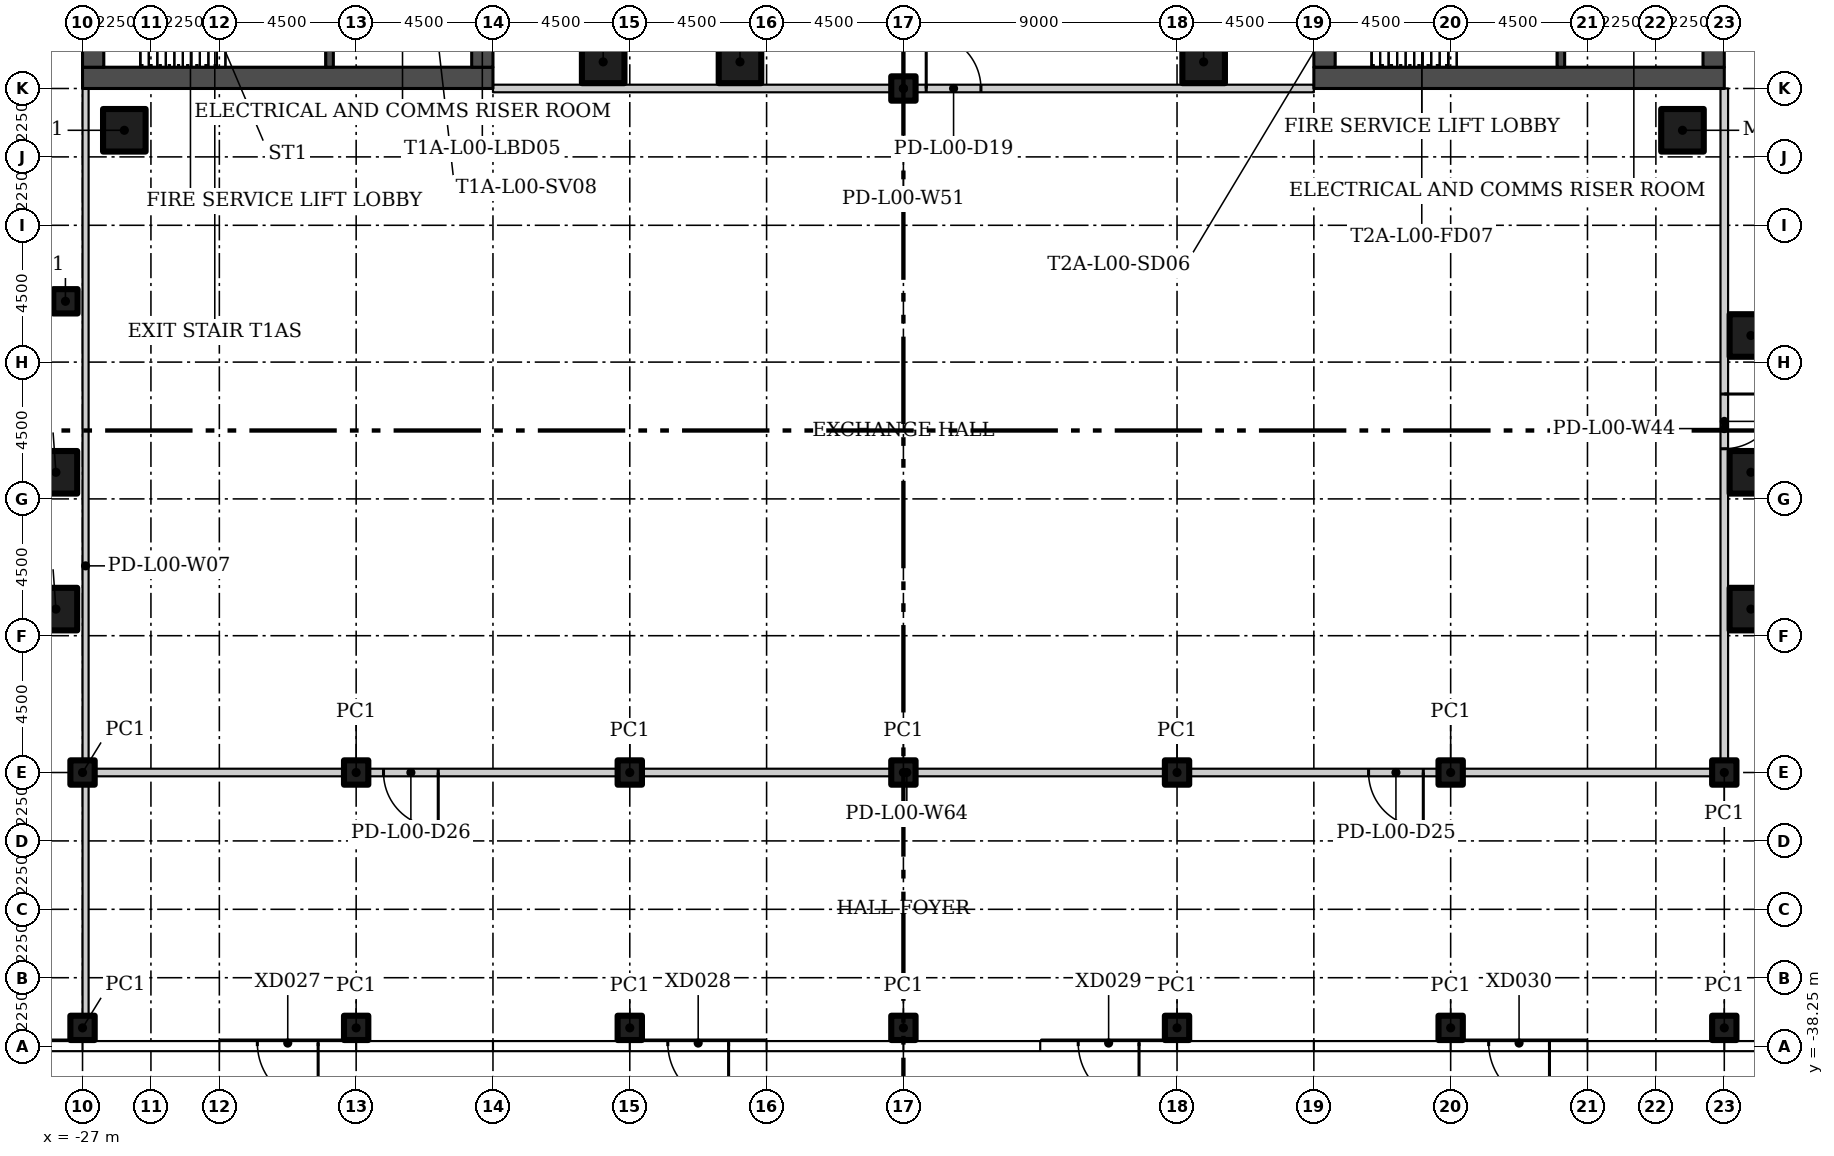
"""IFC4 building model, lengths in metres.
Left out: names, types, materials, properties, quantities, classifications, styles, units other than length and angle.
Written with IfcOpenShell. Run it as: python <this file> out.ifc"""

import sys

from ifc_helpers import new_model, si_unit, direction, frame, frame_2d, origin, origin_2d, place, context, subcontext, project, spatial, rectangle, hollow_rectangle, extrude, element, fill, save


model = new_model("IFC4")
c1 = context("Model", 3, precision=1e-05, world=origin(), true_north=direction((0.0, 1.0)))
c2 = subcontext(c1, "Body", "Model", "MODEL_VIEW")
j1 = project(units=[si_unit("LENGTHUNIT", "METRE"), si_unit("PLANEANGLEUNIT", "RADIAN")], contexts=[c1])
p1 = place(None, origin())
s1 = spatial("IfcSite", under=j1, at=p1, CompositionType="ELEMENT")
p2 = place(p1, origin())
s2 = spatial("IfcBuilding", under=s1, at=p2, CompositionType="ELEMENT")
p3 = place(p2, origin())
s3 = spatial("IfcBuildingStorey", under=s2, at=p3, CompositionType="ELEMENT", Elevation=0.0)
p4 = place(p3, frame((-25.625, -8.125, 0.0)))
e1 = element("IfcColumn", 1, at=p4, inside=s3, PredefinedType="COLUMN", context=c2, shape_type="SweptSolid", body=[
    extrude(hollow_rectangle(XDim=1.4, YDim=1.4, WallThickness=0.06, at=origin_2d()), origin(), (0.0, 0.0, 1.0), 6.5),
])
for number, where in (
    (2, (-9.875, -5.875, 0.0)),
    (3, (-5.375, -5.875, 0.0)),
):
    element("IfcColumn", number, at=place(p3, frame(where)), inside=s3, PredefinedType="COLUMN", context=c2, shape_type="SweptSolid", body=[
        extrude(hollow_rectangle(XDim=1.4, YDim=1.4, WallThickness=0.06, at=origin_2d()), origin(), (0.0, 0.0, 1.0), 6.1),
    ])
p5 = place(p3, frame((-27.562, -13.75, 0.0)))
e4 = element("IfcColumn", 4, at=p5, inside=s3, PredefinedType="COLUMN", context=c2, shape_type="SweptSolid", body=[
    extrude(hollow_rectangle(XDim=0.8, YDim=0.8, WallThickness=0.03, at=origin_2d()), origin(), (0.0, 0.0, 1.0), 6.1),
])
for number, where in (
    (5, (-27.875, -19.375, 0.0)),
    (6, (-27.875, -23.875, 0.0)),
):
    element("IfcColumn", number, at=place(p3, frame(where)), inside=s3, PredefinedType="COLUMN", context=c2, shape_type="SweptSolid", body=[
        extrude(hollow_rectangle(XDim=1.4, YDim=1.4, WallThickness=0.06, at=origin_2d()), origin(), (0.0, 0.0, 1.0), 6.1),
    ])
p6 = place(p3, frame((25.625, -8.125, 0.0)))
e7 = element("IfcColumn", 7, at=p6, inside=s3, PredefinedType="COLUMN", context=c2, shape_type="SweptSolid", body=[
    extrude(hollow_rectangle(XDim=1.4, YDim=1.4, WallThickness=0.06, at=origin_2d()), origin(), (0.0, 0.0, 1.0), 6.5),
])
for number, where in (
    (8, (27.875, -14.875, 0.0)),
    (9, (27.875, -19.375, 0.0)),
    (10, (27.875, -23.875, 0.0)),
    (11, (9.875, -5.875, 0.0)),
):
    element("IfcColumn", number, at=place(p3, frame(where)), inside=s3, PredefinedType="COLUMN", context=c2, shape_type="SweptSolid", body=[
        extrude(hollow_rectangle(XDim=1.4, YDim=1.4, WallThickness=0.06, at=origin_2d()), origin(), (0.0, 0.0, 1.0), 6.1),
    ])
for number, where in (
    (12, (-27.0, -37.65, 0.0)),
    (13, (-27.0, -29.25, 0.0)),
    (14, (-18.0, -37.65, 0.0)),
    (15, (-18.0, -29.25, 0.0)),
    (16, (-9.0, -37.65, 0.0)),
    (17, (-9.0, -29.25, 0.0)),
    (18, (0.0, -37.65, 0.0)),
    (19, (0.0, -29.25, 0.0)),
    (20, (9.0, -37.65, 0.0)),
    (21, (9.0, -29.25, 0.0)),
    (22, (18.0, -37.65, 0.0)),
    (23, (18.0, -29.25, 0.0)),
    (24, (27.0, -37.65, 0.0)),
    (25, (27.0, -29.25, 0.0)),
    (26, (0.0, -6.75, 0.0)),
):
    element("IfcColumn", number, at=place(p3, frame(where)), inside=s3, PredefinedType="COLUMN", context=c2, shape_type="SweptSolid", body=[
        extrude(hollow_rectangle(XDim=0.8, YDim=0.8, WallThickness=0.03, at=origin_2d()), origin(), (0.0, 0.0, 1.0), 6.1),
    ])
p7 = place(p3, frame((-26.9, -38.155, 0.0), z_axis=(0.0, 0.0, 1.0), x_axis=(0.0, 1.0, 0.0)))
e27 = element("IfcWall", 27, at=p7, inside=s3, PredefinedType="PARTITIONING", context=c2, shape_type="SweptSolid", body=[
    extrude(rectangle(XDim=31.405, YDim=0.2, at=frame_2d((15.703, 0.0))), origin(), (0.0, 0.0, 1.0), 12.1),
])
p8 = place(p3, frame((27.0, -6.75, 0.0), z_axis=(0.0, 0.0, 1.0), x_axis=(0.0, -1.0, 0.0)))
e28 = element("IfcWall", 28, at=p8, inside=s3, PredefinedType="PARTITIONING", context=c2, shape_type="SweptSolid", body=[
    extrude(rectangle(XDim=22.375, YDim=0.25, at=frame_2d((11.188, 0.0))), origin(), (0.0, 0.0, 1.0), 12.1),
])
p9 = place(p8, frame((10.05, 0.0, 0.0)))
e29 = element("IfcOpeningElement", 29, at=p9, cuts=e28, PredefinedType="OPENING", context=c2, shape_type="SweptSolid", body=[
    extrude(rectangle(XDim=1.8, YDim=2.4, at=frame_2d((0.9, 1.2))), frame((0.0, 0.135, 0.0), z_axis=(0.0, -1.0, 0.0), x_axis=(1.0, 0.0, 0.0)), (0.0, 0.0, 1.0), 0.27),
])
p10 = place(p3, frame((-13.5, -6.75, 0.0)))
e30 = element("IfcWall", 30, at=p10, inside=s3, PredefinedType="PARTITIONING", context=c2, shape_type="SweptSolid", body=[
    extrude(rectangle(XDim=27.0, YDim=0.25, at=frame_2d((13.5, 0.0))), origin(), (0.0, 0.0, 1.0), 12.1),
])
p11 = place(p10, frame((14.25, 0.0, 0.0)))
e31 = element("IfcOpeningElement", 31, at=p11, cuts=e30, PredefinedType="OPENING", context=c2, shape_type="SweptSolid", body=[
    extrude(rectangle(XDim=1.8, YDim=2.4, at=frame_2d((0.9, 1.2))), frame((0.0, 0.135, 0.0), z_axis=(0.0, -1.0, 0.0), x_axis=(1.0, 0.0, 0.0)), (0.0, 0.0, 1.0), 0.27),
])
p12 = place(p3, frame((27.125, -29.25, 0.0), z_axis=(0.0, 0.0, 1.0), x_axis=(-1.0, 0.0, 0.0)))
e32 = element("IfcWall", 32, at=p12, inside=s3, PredefinedType="PARTITIONING", context=c2, shape_type="SweptSolid", body=[
    extrude(rectangle(XDim=54.025, YDim=0.25, at=frame_2d((27.012, 0.0))), origin(), (0.0, 0.0, 1.0), 12.1),
])
p13 = place(p12, frame((10.025, 0.0, 0.0)))
e33 = element("IfcOpeningElement", 33, at=p13, cuts=e32, PredefinedType="OPENING", context=c2, shape_type="SweptSolid", body=[
    extrude(rectangle(XDim=1.8, YDim=2.4, at=frame_2d((0.9, 1.2))), frame((0.0, 0.135, 0.0), z_axis=(0.0, -1.0, 0.0), x_axis=(1.0, 0.0, 0.0)), (0.0, 0.0, 1.0), 0.27),
])
p14 = place(p12, frame((42.425, 0.0, 0.0)))
e34 = element("IfcOpeningElement", 34, at=p14, cuts=e32, PredefinedType="OPENING", context=c2, shape_type="SweptSolid", body=[
    extrude(rectangle(XDim=1.8, YDim=2.4, at=frame_2d((0.9, 1.2))), frame((0.0, 0.135, 0.0), z_axis=(0.0, -1.0, 0.0), x_axis=(1.0, 0.0, 0.0)), (0.0, 0.0, 1.0), 0.27),
])
p15 = place(p3, frame((-26.993, -38.15, 0.0), z_axis=(0.0, 0.0, 1.0), x_axis=(-1.0, 0.0, 0.0)))
e35 = element("IfcWall", 35, at=p15, inside=s3, PredefinedType="SOLIDWALL", context=c2, shape_type="SweptSolid", body=[
    extrude(rectangle(XDim=4.514, YDim=0.2, at=frame_2d((2.257, 0.0))), origin(), (0.0, 0.0, 1.0), 3.0),
])
p16 = place(p15, frame((1.657, 0.0, 0.0)))
e36 = element("IfcOpeningElement", 36, at=p16, cuts=e35, PredefinedType="OPENING", context=c2, shape_type="SweptSolid", body=[
    extrude(rectangle(XDim=1.2, YDim=2.4, at=frame_2d((0.6, 1.2))), frame((0.0, 0.11, 0.0), z_axis=(0.0, -1.0, 0.0), x_axis=(1.0, 0.0, 0.0)), (0.0, 0.0, 1.0), 0.22),
])
p17 = place(p3, frame((-18.04, -38.15, 0.0), z_axis=(0.0, 0.0, 1.0), x_axis=(-1.0, 0.0, 0.0)))
e37 = element("IfcWall", 37, at=p17, inside=s3, PredefinedType="SOLIDWALL", context=c2, shape_type="SweptSolid", body=[
    extrude(rectangle(XDim=4.42, YDim=0.2, at=frame_2d((2.21, 0.0))), origin(), (0.0, 0.0, 1.0), 3.0),
])
p18 = place(p17, frame((1.21, 0.0, 0.0)))
e38 = element("IfcOpeningElement", 38, at=p18, cuts=e37, PredefinedType="OPENING", context=c2, shape_type="SweptSolid", body=[
    extrude(rectangle(XDim=2.0, YDim=2.4, at=frame_2d((1.0, 1.2))), frame((0.0, 0.11, 0.0), z_axis=(0.0, -1.0, 0.0), x_axis=(1.0, 0.0, 0.0)), (0.0, 0.0, 1.0), 0.22),
])
p19 = place(p3, frame((-4.54, -38.15, 0.0), z_axis=(0.0, 0.0, 1.0), x_axis=(-1.0, 0.0, 0.0)))
e39 = element("IfcWall", 39, at=p19, inside=s3, PredefinedType="SOLIDWALL", context=c2, shape_type="SweptSolid", body=[
    extrude(rectangle(XDim=4.42, YDim=0.2, at=frame_2d((2.21, 0.0))), origin(), (0.0, 0.0, 1.0), 3.0),
])
p20 = place(p19, frame((1.21, 0.0, 0.0)))
e40 = element("IfcOpeningElement", 40, at=p20, cuts=e39, PredefinedType="OPENING", context=c2, shape_type="SweptSolid", body=[
    extrude(rectangle(XDim=2.0, YDim=2.4, at=frame_2d((1.0, 1.2))), frame((0.0, 0.11, 0.0), z_axis=(0.0, -1.0, 0.0), x_axis=(1.0, 0.0, 0.0)), (0.0, 0.0, 1.0), 0.22),
])
p21 = place(p3, frame((8.96, -38.15, 0.0), z_axis=(0.0, 0.0, 1.0), x_axis=(-1.0, 0.0, 0.0)))
e41 = element("IfcWall", 41, at=p21, inside=s3, PredefinedType="SOLIDWALL", context=c2, shape_type="SweptSolid", body=[
    extrude(rectangle(XDim=4.42, YDim=0.2, at=frame_2d((2.21, 0.0))), origin(), (0.0, 0.0, 1.0), 3.0),
])
p22 = place(p21, frame((1.21, 0.0, 0.0)))
e42 = element("IfcOpeningElement", 42, at=p22, cuts=e41, PredefinedType="OPENING", context=c2, shape_type="SweptSolid", body=[
    extrude(rectangle(XDim=2.0, YDim=2.4, at=frame_2d((1.0, 1.2))), frame((0.0, 0.11, 0.0), z_axis=(0.0, -1.0, 0.0), x_axis=(1.0, 0.0, 0.0)), (0.0, 0.0, 1.0), 0.22),
])
p23 = place(p3, frame((22.46, -38.15, 0.0), z_axis=(0.0, 0.0, 1.0), x_axis=(-1.0, 0.0, 0.0)))
e43 = element("IfcWall", 43, at=p23, inside=s3, PredefinedType="SOLIDWALL", context=c2, shape_type="SweptSolid", body=[
    extrude(rectangle(XDim=4.42, YDim=0.2, at=frame_2d((2.21, 0.0))), origin(), (0.0, 0.0, 1.0), 3.0),
])
p24 = place(p23, frame((1.21, 0.0, 0.0)))
e44 = element("IfcOpeningElement", 44, at=p24, cuts=e43, PredefinedType="OPENING", context=c2, shape_type="SweptSolid", body=[
    extrude(rectangle(XDim=2.0, YDim=2.4, at=frame_2d((1.0, 1.2))), frame((0.0, 0.11, 0.0), z_axis=(0.0, -1.0, 0.0), x_axis=(1.0, 0.0, 0.0)), (0.0, 0.0, 1.0), 0.22),
])
p25 = place(p3, frame((-27.0, -6.4, 0.0)))
e45 = element("IfcWall", 45, at=p25, inside=s3, PredefinedType="SHEAR", context=c2, shape_type="SweptSolid", body=[
    extrude(rectangle(XDim=13.5, YDim=0.7, at=frame_2d((6.75, 0.0))), origin(), (0.0, 0.0, 1.0), 6.1),
])
p26 = place(p3, frame((-26.65, -6.05, 0.0), z_axis=(0.0, 0.0, 1.0), x_axis=(0.0, 1.0, 0.0)))
e46 = element("IfcWall", 46, at=p26, inside=s3, PredefinedType="SHEAR", context=c2, shape_type="SweptSolid", body=[
    extrude(rectangle(XDim=2.55, YDim=0.7, at=frame_2d((1.275, 0.0))), origin(), (0.0, 0.0, 1.0), 6.1),
])
p27 = place(p26, frame((0.675, 0.0, 0.0)))
e47 = element("IfcOpeningElement", 47, at=p27, cuts=e46, PredefinedType="OPENING", context=c2, shape_type="SweptSolid", body=[
    extrude(rectangle(XDim=1.2, YDim=2.4, at=frame_2d((0.6, 1.2))), frame((0.0, 0.36, 0.0), z_axis=(0.0, -1.0, 0.0), x_axis=(1.0, 0.0, 0.0)), (0.0, 0.0, 1.0), 0.72),
])
p28 = place(p3, frame((-13.85, 6.05, 0.0), z_axis=(0.0, 0.0, 1.0), x_axis=(0.0, -1.0, 0.0)))
e48 = element("IfcWall", 48, at=p28, inside=s3, PredefinedType="SHEAR", context=c2, shape_type="SweptSolid", body=[
    extrude(rectangle(XDim=12.1, YDim=0.7, at=frame_2d((6.05, 0.0))), origin(), (0.0, 0.0, 1.0), 6.1),
])
p29 = place(p28, frame((10.1, 0.0, 0.0)))
e49 = element("IfcOpeningElement", 49, at=p29, cuts=e48, PredefinedType="OPENING", context=c2, shape_type="SweptSolid", body=[
    extrude(rectangle(XDim=1.2, YDim=2.1, at=frame_2d((0.6, 1.05))), frame((0.0, 0.36, 0.0), z_axis=(0.0, -1.0, 0.0), x_axis=(1.0, 0.0, 0.0)), (0.0, 0.0, 1.0), 0.72),
])
p30 = place(p28, frame((3.9, 0.0, 0.0)))
e50 = element("IfcOpeningElement", 50, at=p30, cuts=e48, PredefinedType="OPENING", context=c2, shape_type="SweptSolid", body=[
    extrude(rectangle(XDim=1.8, YDim=2.4, at=frame_2d((0.9, 1.2))), frame((0.0, 0.36, 0.0), z_axis=(0.0, -1.0, 0.0), x_axis=(1.0, 0.0, 0.0)), (0.0, 0.0, 1.0), 0.72),
])
p31 = place(p3, frame((-18.875, -6.05, 0.0), z_axis=(0.0, 0.0, 1.0), x_axis=(0.0, 1.0, 0.0)))
e51 = element("IfcWall", 51, at=p31, inside=s3, PredefinedType="SHEAR", context=c2, shape_type="SweptSolid", body=[
    extrude(rectangle(XDim=2.55, YDim=0.25, at=frame_2d((1.275, 0.0))), origin(), (0.0, 0.0, 1.0), 6.1),
])
p32 = place(p3, frame((13.5, -6.4, 0.0)))
e52 = element("IfcWall", 52, at=p32, inside=s3, PredefinedType="SHEAR", context=c2, shape_type="SweptSolid", body=[
    extrude(rectangle(XDim=13.5, YDim=0.7, at=frame_2d((6.75, 0.0))), origin(), (0.0, 0.0, 1.0), 6.1),
])
p33 = place(p3, frame((13.85, -6.05, 0.0), z_axis=(0.0, 0.0, 1.0), x_axis=(0.0, 1.0, 0.0)))
e53 = element("IfcWall", 53, at=p33, inside=s3, PredefinedType="SHEAR", context=c2, shape_type="SweptSolid", body=[
    extrude(rectangle(XDim=2.55, YDim=0.7, at=frame_2d((1.275, 0.0))), origin(), (0.0, 0.0, 1.0), 6.1),
])
p34 = place(p33, frame((0.675, 0.0, 0.0)))
e54 = element("IfcOpeningElement", 54, at=p34, cuts=e53, PredefinedType="OPENING", context=c2, shape_type="SweptSolid", body=[
    extrude(rectangle(XDim=1.2, YDim=2.4, at=frame_2d((0.6, 1.2))), frame((0.0, 0.36, 0.0), z_axis=(0.0, -1.0, 0.0), x_axis=(1.0, 0.0, 0.0)), (0.0, 0.0, 1.0), 0.72),
])
p35 = place(p3, frame((26.65, 6.05, 0.0), z_axis=(0.0, 0.0, 1.0), x_axis=(0.0, -1.0, 0.0)))
e55 = element("IfcWall", 55, at=p35, inside=s3, PredefinedType="SHEAR", context=c2, shape_type="SweptSolid", body=[
    extrude(rectangle(XDim=12.1, YDim=0.7, at=frame_2d((6.05, 0.0))), origin(), (0.0, 0.0, 1.0), 6.1),
])
p36 = place(p35, frame((10.1, 0.0, 0.0)))
e56 = element("IfcOpeningElement", 56, at=p36, cuts=e55, PredefinedType="OPENING", context=c2, shape_type="SweptSolid", body=[
    extrude(rectangle(XDim=1.2, YDim=2.1, at=frame_2d((0.6, 1.05))), frame((0.0, 0.36, 0.0), z_axis=(0.0, -1.0, 0.0), x_axis=(1.0, 0.0, 0.0)), (0.0, 0.0, 1.0), 0.72),
])
p37 = place(p35, frame((3.9, 0.0, 0.0)))
e57 = element("IfcOpeningElement", 57, at=p37, cuts=e55, PredefinedType="OPENING", context=c2, shape_type="SweptSolid", body=[
    extrude(rectangle(XDim=1.8, YDim=2.4, at=frame_2d((0.9, 1.2))), frame((0.0, 0.36, 0.0), z_axis=(0.0, -1.0, 0.0), x_axis=(1.0, 0.0, 0.0)), (0.0, 0.0, 1.0), 0.72),
])
p38 = place(p3, frame((21.625, -6.05, 0.0), z_axis=(0.0, 0.0, 1.0), x_axis=(0.0, 1.0, 0.0)))
e58 = element("IfcWall", 58, at=p38, inside=s3, PredefinedType="SHEAR", context=c2, shape_type="SweptSolid", body=[
    extrude(rectangle(XDim=2.55, YDim=0.25, at=frame_2d((1.275, 0.0))), origin(), (0.0, 0.0, 1.0), 6.1),
])
p39 = place(p11, origin())
e59 = element("IfcDoor", 59, at=p39, inside=s3, OperationType="DOUBLE_DOOR_SINGLE_SWING", PredefinedType="DOOR", context=c2, shape_type="SweptSolid", body=[
    extrude(rectangle(XDim=1.8, YDim=2.4, at=frame_2d((0.9, 1.2))), frame((0.0, 0.025, 0.0), z_axis=(0.0, -1.0, 0.0), x_axis=(1.0, 0.0, 0.0)), (0.0, 0.0, 1.0), 0.05),
])
fill(e31, e59)
p40 = place(p13, origin())
e60 = element("IfcDoor", 60, at=p40, inside=s3, OperationType="DOUBLE_DOOR_SINGLE_SWING", PredefinedType="DOOR", context=c2, shape_type="SweptSolid", body=[
    extrude(rectangle(XDim=1.8, YDim=2.4, at=frame_2d((0.9, 1.2))), frame((0.0, 0.025, 0.0), z_axis=(0.0, -1.0, 0.0), x_axis=(1.0, 0.0, 0.0)), (0.0, 0.0, 1.0), 0.05),
])
fill(e33, e60)
p41 = place(p14, origin())
e61 = element("IfcDoor", 61, at=p41, inside=s3, OperationType="DOUBLE_DOOR_SINGLE_SWING", PredefinedType="DOOR", context=c2, shape_type="SweptSolid", body=[
    extrude(rectangle(XDim=1.8, YDim=2.4, at=frame_2d((0.9, 1.2))), frame((0.0, 0.025, 0.0), z_axis=(0.0, -1.0, 0.0), x_axis=(1.0, 0.0, 0.0)), (0.0, 0.0, 1.0), 0.05),
])
fill(e34, e61)
p42 = place(p9, origin())
e62 = element("IfcDoor", 62, at=p42, inside=s3, OperationType="DOUBLE_DOOR_SINGLE_SWING", PredefinedType="DOOR", context=c2, shape_type="SweptSolid", body=[
    extrude(rectangle(XDim=1.8, YDim=2.4, at=frame_2d((0.9, 1.2))), frame((0.0, 0.025, 0.0), z_axis=(0.0, -1.0, 0.0), x_axis=(1.0, 0.0, 0.0)), (0.0, 0.0, 1.0), 0.05),
])
fill(e29, e62)
p43 = place(p18, origin())
e63 = element("IfcDoor", 63, at=p43, inside=s3, OperationType="DOUBLE_DOOR_SINGLE_SWING", PredefinedType="DOOR", context=c2, shape_type="SweptSolid", body=[
    extrude(rectangle(XDim=2.0, YDim=2.4, at=frame_2d((1.0, 1.2))), frame((0.0, 0.025, 0.0), z_axis=(0.0, -1.0, 0.0), x_axis=(1.0, 0.0, 0.0)), (0.0, 0.0, 1.0), 0.05),
])
fill(e38, e63)
p44 = place(p20, origin())
e64 = element("IfcDoor", 64, at=p44, inside=s3, OperationType="DOUBLE_DOOR_SINGLE_SWING", PredefinedType="DOOR", context=c2, shape_type="SweptSolid", body=[
    extrude(rectangle(XDim=2.0, YDim=2.4, at=frame_2d((1.0, 1.2))), frame((0.0, 0.025, 0.0), z_axis=(0.0, -1.0, 0.0), x_axis=(1.0, 0.0, 0.0)), (0.0, 0.0, 1.0), 0.05),
])
fill(e40, e64)
p45 = place(p22, origin())
e65 = element("IfcDoor", 65, at=p45, inside=s3, OperationType="DOUBLE_DOOR_SINGLE_SWING", PredefinedType="DOOR", context=c2, shape_type="SweptSolid", body=[
    extrude(rectangle(XDim=2.0, YDim=2.4, at=frame_2d((1.0, 1.2))), frame((0.0, 0.025, 0.0), z_axis=(0.0, -1.0, 0.0), x_axis=(1.0, 0.0, 0.0)), (0.0, 0.0, 1.0), 0.05),
])
fill(e42, e65)
p46 = place(p24, origin())
e66 = element("IfcDoor", 66, at=p46, inside=s3, OperationType="DOUBLE_DOOR_SINGLE_SWING", PredefinedType="DOOR", context=c2, shape_type="SweptSolid", body=[
    extrude(rectangle(XDim=2.0, YDim=2.4, at=frame_2d((1.0, 1.2))), frame((0.0, 0.025, 0.0), z_axis=(0.0, -1.0, 0.0), x_axis=(1.0, 0.0, 0.0)), (0.0, 0.0, 1.0), 0.05),
])
fill(e44, e66)
save(model, sys.argv[1])
